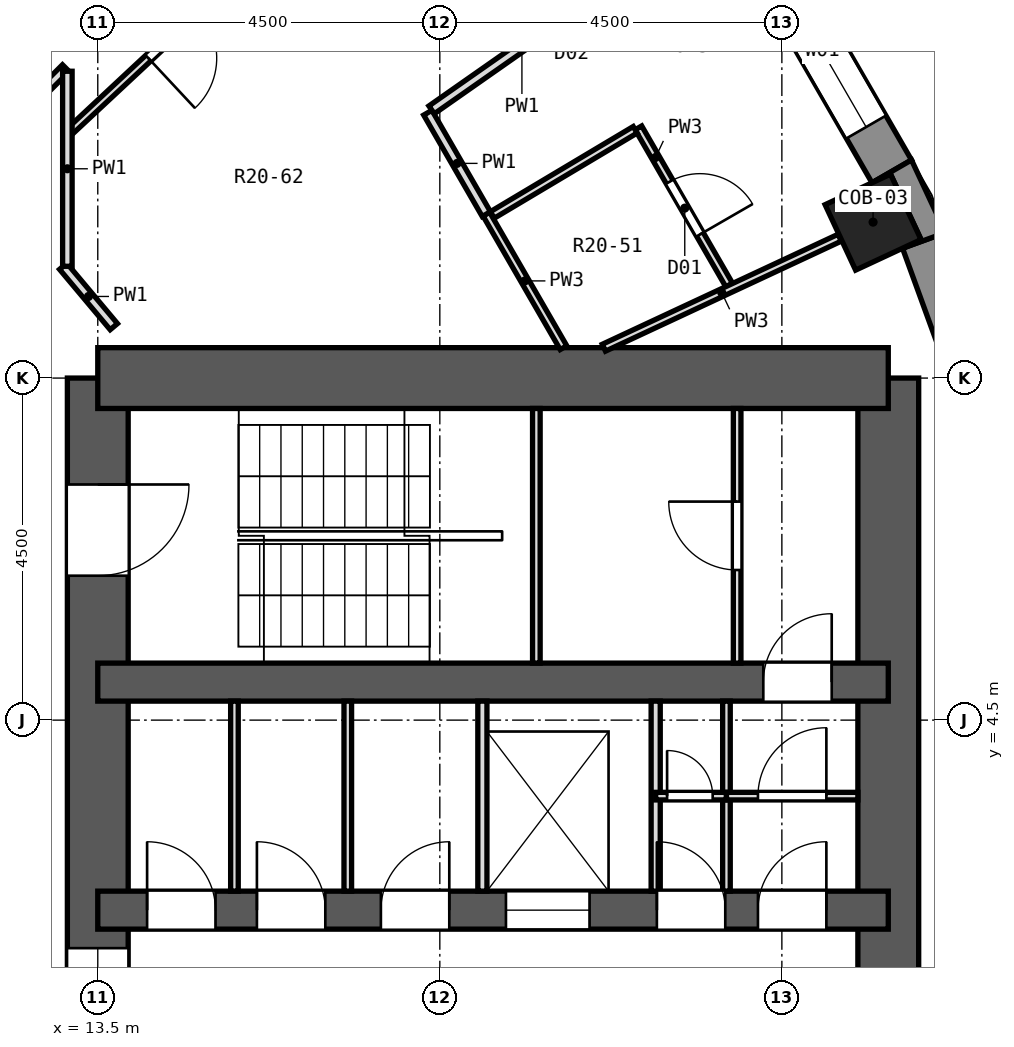
"""IFC4 building model, lengths in metres.
Left out: names, types, materials, properties, quantities, classifications, styles, units other than length and angle.
Written with IfcOpenShell. Run it as: python <this file> out.ifc"""

import sys

from ifc_helpers import new_model, si_unit, direction, frame, frame_2d, origin, origin_2d, place, context, subcontext, project, spatial, polyline, rectangle, outline, extrude, element, fill, save


model = new_model("IFC4")
c1 = context("Model", 3, precision=1e-05, world=origin(), true_north=direction((0.0, 1.0)))
c2 = subcontext(c1, "Body", "Model", "MODEL_VIEW")
j1 = project(units=[si_unit("LENGTHUNIT", "METRE"), si_unit("PLANEANGLEUNIT", "RADIAN")], contexts=[c1])
p1 = place(None, origin())
s1 = spatial("IfcSite", under=j1, at=p1, CompositionType="ELEMENT")
p2 = place(p1, origin())
s2 = spatial("IfcBuilding", under=s1, at=p2, CompositionType="ELEMENT")
p3 = place(p2, frame((0.0, 0.0, 121.6)))
s3 = spatial("IfcBuildingStorey", under=s2, at=p3, CompositionType="ELEMENT", Elevation=121.6)
p4 = place(p3, frame((23.7, 11.052, 0.0), z_axis=(0.0, 0.0, 1.0), x_axis=(0.906307787037, 0.422618261741, 0.0)))
e1 = element("IfcColumn", 1, at=p4, inside=s3, PredefinedType="COLUMN", context=c2, shape_type="SweptSolid", body=[
    extrude(rectangle(XDim=0.95, YDim=0.95, at=origin_2d()), origin(), (0.0, 0.0, 1.0), 3.3),
])
p5 = place(p3, frame((13.5, -9.0, 0.0), z_axis=(0.0, 0.0, 1.0), x_axis=(0.0, 1.0, 0.0)))
e2 = element("IfcWall", 2, at=p5, inside=s3, PredefinedType="SHEAR", context=c2, shape_type="SweptSolid", body=[
    extrude(rectangle(XDim=18.0, YDim=0.8, at=frame_2d((9.0, 0.0))), origin(), (0.0, 0.0, 1.0), 3.3),
])
p6 = place(p5, frame((15.4, 0.0, 0.0)))
e3 = element("IfcOpeningElement", 3, at=p6, cuts=e2, PredefinedType="OPENING", context=c2, shape_type="SweptSolid", body=[
    extrude(rectangle(XDim=1.2, YDim=2.1, at=frame_2d((0.6, 1.05))), frame((0.0, 0.412, 0.0), z_axis=(0.0, -1.0, 0.0), x_axis=(1.0, 0.0, 0.0)), (0.0, 0.0, 1.0), 0.824),
])
p7 = place(p5, frame((1.4, 0.0, 0.0)))
e4 = element("IfcOpeningElement", 4, at=p7, cuts=e2, PredefinedType="OPENING", context=c2, shape_type="SweptSolid", body=[
    extrude(rectangle(XDim=1.2, YDim=2.1, at=frame_2d((0.6, 1.05))), frame((0.0, 0.412, 0.0), z_axis=(0.0, -1.0, 0.0), x_axis=(1.0, 0.0, 0.0)), (0.0, 0.0, 1.0), 0.824),
])
p8 = place(p5, frame((7.5, 0.0, 0.0)))
e5 = element("IfcOpeningElement", 5, at=p8, cuts=e2, PredefinedType="OPENING", context=c2, shape_type="SweptSolid", body=[
    extrude(rectangle(XDim=3.0, YDim=2.4, at=frame_2d((1.5, 1.2))), frame((0.0, 0.412, 0.0), z_axis=(0.0, -1.0, 0.0), x_axis=(1.0, 0.0, 0.0)), (0.0, 0.0, 1.0), 0.824),
])
p9 = place(p3, frame((23.9, -9.0, 0.0), z_axis=(0.0, 0.0, 1.0), x_axis=(0.0, 1.0, 0.0)))
e6 = element("IfcWall", 6, at=p9, inside=s3, PredefinedType="SHEAR", context=c2, shape_type="SweptSolid", body=[
    extrude(rectangle(XDim=18.0, YDim=0.8, at=frame_2d((9.0, 0.0))), origin(), (0.0, 0.0, 1.0), 3.3),
])
p10 = place(p3, frame((13.5, 9.0, 0.0), z_axis=(0.0, 0.0, 1.0), x_axis=(1.0, 0.0, 0.0)))
e7 = element("IfcWall", 7, at=p10, inside=s3, PredefinedType="SHEAR", context=c2, shape_type="SweptSolid", body=[
    extrude(rectangle(XDim=10.4, YDim=0.8, at=frame_2d((5.2, 0.0))), origin(), (0.0, 0.0, 1.0), 3.3),
])
p11 = place(p3, frame((13.5, 5.0, 0.0), z_axis=(0.0, 0.0, 1.0), x_axis=(1.0, 0.0, 0.0)))
e8 = element("IfcWall", 8, at=p11, inside=s3, PredefinedType="SHEAR", context=c2, shape_type="SweptSolid", body=[
    extrude(rectangle(XDim=10.4, YDim=0.5, at=frame_2d((5.2, 0.0))), origin(), (0.0, 0.0, 1.0), 3.3),
])
p12 = place(p11, frame((8.756, 0.0, 0.0)))
e9 = element("IfcOpeningElement", 9, at=p12, cuts=e8, PredefinedType="OPENING", context=c2, shape_type="SweptSolid", body=[
    extrude(rectangle(XDim=0.9, YDim=2.1, at=frame_2d((0.45, 1.05))), frame((0.0, 0.262, 0.0), z_axis=(0.0, -1.0, 0.0), x_axis=(1.0, 0.0, 0.0)), (0.0, 0.0, 1.0), 0.524),
])
p13 = place(p3, frame((13.5, 2.0, 0.0), z_axis=(0.0, 0.0, 1.0), x_axis=(1.0, 0.0, 0.0)))
e10 = element("IfcWall", 10, at=p13, inside=s3, PredefinedType="SHEAR", context=c2, shape_type="SweptSolid", body=[
    extrude(rectangle(XDim=10.4, YDim=0.5, at=frame_2d((5.2, 0.0))), origin(), (0.0, 0.0, 1.0), 3.3),
])
p14 = place(p13, frame((5.37, 0.0, 0.0)))
e11 = element("IfcOpeningElement", 11, at=p14, cuts=e10, PredefinedType="OPENING", context=c2, shape_type="SweptSolid", body=[
    extrude(rectangle(XDim=1.1, YDim=2.1, at=frame_2d((0.55, 1.05))), frame((0.0, 0.262, 0.0), z_axis=(0.0, -1.0, 0.0), x_axis=(1.0, 0.0, 0.0)), (0.0, 0.0, 1.0), 0.524),
])
p15 = place(p13, frame((0.649, 0.0, 0.0)))
e12 = element("IfcOpeningElement", 12, at=p15, cuts=e10, PredefinedType="OPENING", context=c2, shape_type="SweptSolid", body=[
    extrude(rectangle(XDim=0.9, YDim=2.1, at=frame_2d((0.45, 1.05))), frame((0.0, 0.262, 0.0), z_axis=(0.0, -1.0, 0.0), x_axis=(1.0, 0.0, 0.0)), (0.0, 0.0, 1.0), 0.524),
])
p16 = place(p13, frame((2.094, 0.0, 0.0)))
e13 = element("IfcOpeningElement", 13, at=p16, cuts=e10, PredefinedType="OPENING", context=c2, shape_type="SweptSolid", body=[
    extrude(rectangle(XDim=0.9, YDim=2.1, at=frame_2d((0.45, 1.05))), frame((0.0, 0.262, 0.0), z_axis=(0.0, -1.0, 0.0), x_axis=(1.0, 0.0, 0.0)), (0.0, 0.0, 1.0), 0.524),
])
p17 = place(p13, frame((3.725, 0.0, 0.0)))
e14 = element("IfcOpeningElement", 14, at=p17, cuts=e10, PredefinedType="OPENING", context=c2, shape_type="SweptSolid", body=[
    extrude(rectangle(XDim=0.9, YDim=2.1, at=frame_2d((0.45, 1.05))), frame((0.0, 0.262, 0.0), z_axis=(0.0, -1.0, 0.0), x_axis=(1.0, 0.0, 0.0)), (0.0, 0.0, 1.0), 0.524),
])
p18 = place(p13, frame((7.355, 0.0, 0.0)))
e15 = element("IfcOpeningElement", 15, at=p18, cuts=e10, PredefinedType="OPENING", context=c2, shape_type="SweptSolid", body=[
    extrude(rectangle(XDim=0.9, YDim=2.1, at=frame_2d((0.45, 1.05))), frame((0.0, 0.262, 0.0), z_axis=(0.0, -1.0, 0.0), x_axis=(1.0, 0.0, 0.0)), (0.0, 0.0, 1.0), 0.524),
])
p19 = place(p13, frame((8.686, 0.0, 0.0)))
e16 = element("IfcOpeningElement", 16, at=p19, cuts=e10, PredefinedType="OPENING", context=c2, shape_type="SweptSolid", body=[
    extrude(rectangle(XDim=0.9, YDim=2.1, at=frame_2d((0.45, 1.05))), frame((0.0, 0.262, 0.0), z_axis=(0.0, -1.0, 0.0), x_axis=(1.0, 0.0, 0.0)), (0.0, 0.0, 1.0), 0.524),
])
p20 = place(p3, frame((25.617, 7.383, 0.0), z_axis=(0.0, 0.0, 1.0), x_axis=(-0.341990236633, 0.939703505393, 0.0)))
e17 = element("IfcWall", 17, at=p20, inside=s3, PredefinedType="SOLIDWALL", context=c2, shape_type="SweptSolid", body=[
    extrude(rectangle(XDim=3.648, YDim=0.6, at=frame_2d((1.824, 0.0))), origin(), (0.0, 0.0, 1.0), 2.8),
])
p21 = place(p3, frame((23.946, 11.719, 0.0), z_axis=(0.0, 0.0, 1.0), x_axis=(-0.499954196102, 0.866051847062, 0.0)))
e18 = element("IfcWall", 18, at=p21, inside=s3, PredefinedType="SOLIDWALL", context=c2, shape_type="SweptSolid", body=[
    extrude(rectangle(XDim=3.648, YDim=0.6, at=frame_2d((1.824, 0.0))), origin(), (0.0, 0.0, 1.0), 2.8),
])
p22 = place(p21, frame((0.674, 0.0, 0.9)))
e19 = element("IfcOpeningElement", 19, at=p22, cuts=e18, PredefinedType="OPENING", context=c2, shape_type="SweptSolid", body=[
    extrude(rectangle(XDim=2.3, YDim=1.8, at=frame_2d((1.15, 0.9))), frame((0.0, 0.312, 0.0), z_axis=(0.0, -1.0, 0.0), x_axis=(1.0, 0.0, 0.0)), (0.0, 0.0, 1.0), 0.624),
])
p23 = place(p3, origin())
e20 = element("IfcWall", 20, at=p23, inside=s3, PredefinedType="SOLIDWALL", context=c2, shape_type="SweptSolid", body=[
    extrude(outline(polyline([(24.651, 10.913), (24.206, 11.869), (23.686, 11.569), (23.93, 11.683), (24.331, 10.822), (24.087, 10.708), (24.651, 10.913)])), origin(), (0.0, 0.0, 1.0), 2.8),
])
p24 = place(p3, frame((18.612, 11.157, 0.0), z_axis=(0.0, 0.0, 1.0), x_axis=(0.500111227227, -0.865961177191, 0.0)))
e21 = element("IfcWall", 21, at=p24, inside=s3, PredefinedType="PARTITIONING", context=c2, shape_type="SweptSolid", body=[
    extrude(rectangle(XDim=2.029, YDim=0.1, at=frame_2d((1.015, 0.0))), origin(), (0.0, 0.0, 1.0), 2.8),
])
p25 = place(p3, frame((17.842, 12.491, 0.0), z_axis=(0.0, 0.0, 1.0), x_axis=(0.499923693419, -0.866069454927, 0.0)))
e22 = element("IfcWall", 22, at=p25, inside=s3, PredefinedType="PARTITIONING", context=c2, shape_type="SweptSolid", body=[
    extrude(rectangle(XDim=1.54, YDim=0.125, at=frame_2d((0.77, 0.0))), origin(), (0.0, 0.0, 1.0), 2.8),
])
p26 = place(p3, frame((20.613, 12.292, 0.0), z_axis=(0.0, 0.0, 1.0), x_axis=(0.499855185972, -0.866108996061, 0.0)))
e23 = element("IfcWall", 23, at=p26, inside=s3, PredefinedType="PARTITIONING", context=c2, shape_type="SweptSolid", body=[
    extrude(rectangle(XDim=2.388, YDim=0.1, at=frame_2d((1.194, 0.0))), origin(), (0.0, 0.0, 1.0), 2.8),
])
p27 = place(p26, frame((0.819, 0.0, 0.0)))
e24 = element("IfcOpeningElement", 24, at=p27, cuts=e23, PredefinedType="OPENING", context=c2, shape_type="SweptSolid", body=[
    extrude(rectangle(XDim=0.8, YDim=2.1, at=frame_2d((0.4, 1.05))), frame((0.0, 0.062, 0.0), z_axis=(0.0, -1.0, 0.0), x_axis=(1.0, 0.0, 0.0)), (0.0, 0.0, 1.0), 0.124),
])
p28 = place(p3, frame((13.045, 10.47, 0.0), z_axis=(0.0, 0.0, 1.0), x_axis=(0.642683640722, -0.766131671417, 0.0)))
e25 = element("IfcWall", 25, at=p28, inside=s3, PredefinedType="PARTITIONING", context=c2, shape_type="SweptSolid", body=[
    extrude(rectangle(XDim=1.036, YDim=0.125, at=frame_2d((0.518, 0.0))), origin(), (0.0, 0.0, 1.0), 2.8),
])
p29 = place(p3, frame((20.158, 9.399, 0.0), z_axis=(0.0, 0.0, 1.0), x_axis=(0.906223222272, 0.422799564114, 0.0)))
e26 = element("IfcWall", 26, at=p29, inside=s3, PredefinedType="PARTITIONING", context=c2, shape_type="SweptSolid", body=[
    extrude(rectangle(XDim=3.423, YDim=0.1, at=frame_2d((1.711, 0.0))), origin(), (0.0, 0.0, 1.0), 2.8),
])
p30 = place(p3, frame((18.691, 11.146, 0.0), z_axis=(0.0, 0.0, 1.0), x_axis=(0.858956412084, 0.512048710711, 0.0)))
e27 = element("IfcWall", 27, at=p30, inside=s3, PredefinedType="PARTITIONING", context=c2, shape_type="SweptSolid", body=[
    extrude(rectangle(XDim=2.188, YDim=0.1, at=frame_2d((1.094, 0.0))), origin(), (0.0, 0.0, 1.0), 2.8),
])
p31 = place(p3, frame((17.892, 12.529, 0.0), z_axis=(0.0, 0.0, 1.0), x_axis=(0.819258924995, 0.573423764607, 0.0)))
e28 = element("IfcWall", 28, at=p31, inside=s3, PredefinedType="PARTITIONING", context=c2, shape_type="SweptSolid", body=[
    extrude(rectangle(XDim=3.823, YDim=0.125, at=frame_2d((1.911, 0.0))), origin(), (0.0, 0.0, 1.0), 2.8),
])
p32 = place(p31, frame((1.796, 0.0, 0.0)))
e29 = element("IfcOpeningElement", 29, at=p32, cuts=e28, PredefinedType="OPENING", context=c2, shape_type="SweptSolid", body=[
    extrude(rectangle(XDim=0.9, YDim=2.1, at=frame_2d((0.45, 1.05))), frame((0.0, 0.074, 0.0), z_axis=(0.0, -1.0, 0.0), x_axis=(1.0, 0.0, 0.0)), (0.0, 0.0, 1.0), 0.149),
])
p33 = place(p3, frame((13.146, 12.259, 0.0), z_axis=(0.0, 0.0, 1.0), x_axis=(0.731186864942, 0.682177226633, 0.0)))
e30 = element("IfcWall", 30, at=p33, inside=s3, PredefinedType="PARTITIONING", context=c2, shape_type="SweptSolid", body=[
    extrude(rectangle(XDim=3.701, YDim=0.1, at=frame_2d((1.851, 0.0))), origin(), (0.0, 0.0, 1.0), 2.8),
])
p34 = place(p33, frame((1.394, 0.0, 0.0)))
e31 = element("IfcOpeningElement", 31, at=p34, cuts=e30, PredefinedType="OPENING", context=c2, shape_type="SweptSolid", body=[
    extrude(rectangle(XDim=0.9, YDim=2.1, at=frame_2d((0.45, 1.05))), frame((0.0, 0.062, 0.0), z_axis=(0.0, -1.0, 0.0), x_axis=(1.0, 0.0, 0.0)), (0.0, 0.0, 1.0), 0.124),
])
p35 = place(p3, frame((9.697, 9.695, 0.0), z_axis=(0.0, 0.0, 1.0), x_axis=(0.707106781187, 0.707106781187, 0.0)))
e32 = element("IfcWall", 32, at=p35, inside=s3, PredefinedType="PARTITIONING", context=c2, shape_type="SweptSolid", body=[
    extrude(rectangle(XDim=4.784, YDim=0.125, at=frame_2d((2.392, 0.0))), origin(), (0.0, 0.0, 1.0), 2.8),
])
p36 = place(p3, frame((13.1, 10.47, 0.0), z_axis=(0.0, 0.0, 1.0), x_axis=(0.0, 1.0, 0.0)))
e33 = element("IfcWall", 33, at=p36, inside=s3, PredefinedType="PARTITIONING", context=c2, shape_type="SweptSolid", body=[
    extrude(rectangle(XDim=2.566, YDim=0.125, at=frame_2d((1.283, 0.0))), origin(), (0.0, 0.0, 1.0), 2.8),
])
for number, where, z_axis, x_axis in (
    (34, (15.298, 2.25, 0.0), (0.0, 0.0, 1.0), (0.0, 1.0, 0.0)),
    (35, (16.789, 2.25, 0.0), (0.0, 0.0, 1.0), (0.0, 1.0, 0.0)),
):
    element("IfcWall", number, at=place(p3, frame(where, z_axis=z_axis, x_axis=x_axis)), inside=s3, PredefinedType="PARTITIONING", context=c2, shape_type="SweptSolid", body=[
        extrude(rectangle(XDim=2.5, YDim=0.1, at=frame_2d((1.25, 0.0))), origin(), (0.0, 0.0, 1.0), 2.8),
    ])
for number, where, z_axis, x_axis in (
    (36, (18.56, 2.25, 0.0), (0.0, 0.0, 1.0), (0.0, 1.0, 0.0)),
    (37, (20.84, 2.25, 0.0), (0.0, 0.0, 1.0), (0.0, 1.0, 0.0)),
):
    element("IfcWall", number, at=place(p3, frame(where, z_axis=z_axis, x_axis=x_axis)), inside=s3, PredefinedType="PARTITIONING", context=c2, shape_type="SweptSolid", body=[
        extrude(rectangle(XDim=2.5, YDim=0.12, at=frame_2d((1.25, 0.0))), origin(), (0.0, 0.0, 1.0), 2.8),
    ])
p37 = place(p3, frame((21.771, 2.25, 0.0), z_axis=(0.0, 0.0, 1.0), x_axis=(0.0, 1.0, 0.0)))
e38 = element("IfcWall", 38, at=p37, inside=s3, PredefinedType="PARTITIONING", context=c2, shape_type="SweptSolid", body=[
    extrude(rectangle(XDim=2.5, YDim=0.1, at=frame_2d((1.25, 0.0))), origin(), (0.0, 0.0, 1.0), 2.8),
])
p38 = place(p3, frame((20.84, 3.5, 0.0), z_axis=(0.0, 0.0, 1.0), x_axis=(1.0, 0.0, 0.0)))
e39 = element("IfcWall", 39, at=p38, inside=s3, PredefinedType="PARTITIONING", context=c2, shape_type="SweptSolid", body=[
    extrude(rectangle(XDim=0.931, YDim=0.1, at=frame_2d((0.465, 0.0))), origin(), (0.0, 0.0, 1.0), 2.8),
])
p39 = place(p38, frame((0.15, 0.0, 0.0)))
e40 = element("IfcOpeningElement", 40, at=p39, cuts=e39, PredefinedType="OPENING", context=c2, shape_type="SweptSolid", body=[
    extrude(rectangle(XDim=0.6, YDim=2.1, at=frame_2d((0.3, 1.05))), frame((0.0, 0.062, 0.0), z_axis=(0.0, -1.0, 0.0), x_axis=(1.0, 0.0, 0.0)), (0.0, 0.0, 1.0), 0.124),
])
p40 = place(p3, frame((21.771, 3.5, 0.0), z_axis=(0.0, 0.0, 1.0), x_axis=(1.0, 0.0, 0.0)))
e41 = element("IfcWall", 41, at=p40, inside=s3, PredefinedType="PARTITIONING", context=c2, shape_type="SweptSolid", body=[
    extrude(rectangle(XDim=1.729, YDim=0.1, at=frame_2d((0.865, 0.0))), origin(), (0.0, 0.0, 1.0), 2.8),
])
p41 = place(p40, frame((0.415, 0.0, 0.0)))
e42 = element("IfcOpeningElement", 42, at=p41, cuts=e41, PredefinedType="OPENING", context=c2, shape_type="SweptSolid", body=[
    extrude(rectangle(XDim=0.9, YDim=2.1, at=frame_2d((0.45, 1.05))), frame((0.0, 0.062, 0.0), z_axis=(0.0, -1.0, 0.0), x_axis=(1.0, 0.0, 0.0)), (0.0, 0.0, 1.0), 0.124),
])
p42 = place(p3, frame((19.27, 5.25, 0.0), z_axis=(0.0, 0.0, 1.0), x_axis=(0.0, 1.0, 0.0)))
e43 = element("IfcWall", 43, at=p42, inside=s3, PredefinedType="PARTITIONING", context=c2, shape_type="SweptSolid", body=[
    extrude(rectangle(XDim=3.35, YDim=0.1, at=frame_2d((1.675, 0.0))), origin(), (0.0, 0.0, 1.0), 2.8),
])
p43 = place(p3, frame((21.912, 5.25, 0.0), z_axis=(0.0, 0.0, 1.0), x_axis=(0.0, 1.0, 0.0)))
e44 = element("IfcWall", 44, at=p43, inside=s3, PredefinedType="PARTITIONING", context=c2, shape_type="SweptSolid", body=[
    extrude(rectangle(XDim=3.35, YDim=0.1, at=frame_2d((1.675, 0.0))), origin(), (0.0, 0.0, 1.0), 2.8),
])
p44 = place(p43, frame((1.225, 0.0, 0.0)))
e45 = element("IfcOpeningElement", 45, at=p44, cuts=e44, PredefinedType="OPENING", context=c2, shape_type="SweptSolid", body=[
    extrude(rectangle(XDim=0.9, YDim=2.1, at=frame_2d((0.45, 1.05))), frame((0.0, 0.062, 0.0), z_axis=(0.0, -1.0, 0.0), x_axis=(1.0, 0.0, 0.0)), (0.0, 0.0, 1.0), 0.124),
])
p45 = place(p22, origin())
e46 = element("IfcWindow", 46, at=p45, inside=s3, PartitioningType="SINGLE_PANEL", PredefinedType="WINDOW", context=c2, shape_type="SweptSolid", body=[
    extrude(rectangle(XDim=2.3, YDim=1.8, at=frame_2d((1.15, 0.9))), frame((0.0, 0.18, 0.0), z_axis=(0.0, -1.0, 0.0), x_axis=(1.0, 0.0, 0.0)), (0.0, 0.0, 1.0), 0.06),
])
fill(e19, e46)
p46 = place(p27, origin())
e47 = element("IfcDoor", 47, at=p46, inside=s3, OperationType="SINGLE_SWING_RIGHT", PredefinedType="DOOR", context=c2, shape_type="SweptSolid", body=[
    extrude(rectangle(XDim=0.8, YDim=2.1, at=frame_2d((0.4, 1.05))), frame((0.0, 0.025, 0.0), z_axis=(0.0, -1.0, 0.0), x_axis=(1.0, 0.0, 0.0)), (0.0, 0.0, 1.0), 0.05),
])
fill(e24, e47)
p47 = place(p34, frame((0.9, 0.0, 0.0), z_axis=(0.0, 0.0, 1.0), x_axis=(-1.0, 0.0, 0.0)))
e48 = element("IfcDoor", 48, at=p47, inside=s3, OperationType="SINGLE_SWING_RIGHT", PredefinedType="DOOR", context=c2, shape_type="SweptSolid", body=[
    extrude(rectangle(XDim=0.9, YDim=2.1, at=frame_2d((0.45, 1.05))), frame((0.0, 0.025, 0.0), z_axis=(0.0, -1.0, 0.0), x_axis=(1.0, 0.0, 0.0)), (0.0, 0.0, 1.0), 0.05),
])
fill(e31, e48)
p48 = place(p14, origin())
e49 = element("IfcDoor", 49, at=p48, inside=s3, OperationType="DOUBLE_DOOR_SLIDING", PredefinedType="DOOR", context=c2, shape_type="SweptSolid", body=[
    extrude(rectangle(XDim=1.1, YDim=2.1, at=frame_2d((0.55, 1.05))), frame((0.0, 0.025, 0.0), z_axis=(0.0, -1.0, 0.0), x_axis=(1.0, 0.0, 0.0)), (0.0, 0.0, 1.0), 0.05),
])
fill(e11, e49)
p49 = place(p15, origin())
e50 = element("IfcDoor", 50, at=p49, inside=s3, OperationType="SINGLE_SWING_LEFT", PredefinedType="DOOR", context=c2, shape_type="SweptSolid", body=[
    extrude(rectangle(XDim=0.9, YDim=2.1, at=frame_2d((0.45, 1.05))), frame((0.0, 0.025, 0.0), z_axis=(0.0, -1.0, 0.0), x_axis=(1.0, 0.0, 0.0)), (0.0, 0.0, 1.0), 0.05),
])
fill(e12, e50)
p50 = place(p16, origin())
e51 = element("IfcDoor", 51, at=p50, inside=s3, OperationType="SINGLE_SWING_LEFT", PredefinedType="DOOR", context=c2, shape_type="SweptSolid", body=[
    extrude(rectangle(XDim=0.9, YDim=2.1, at=frame_2d((0.45, 1.05))), frame((0.0, 0.025, 0.0), z_axis=(0.0, -1.0, 0.0), x_axis=(1.0, 0.0, 0.0)), (0.0, 0.0, 1.0), 0.05),
])
fill(e13, e51)
p51 = place(p17, origin())
e52 = element("IfcDoor", 52, at=p51, inside=s3, OperationType="SINGLE_SWING_RIGHT", PredefinedType="DOOR", context=c2, shape_type="SweptSolid", body=[
    extrude(rectangle(XDim=0.9, YDim=2.1, at=frame_2d((0.45, 1.05))), frame((0.0, 0.025, 0.0), z_axis=(0.0, -1.0, 0.0), x_axis=(1.0, 0.0, 0.0)), (0.0, 0.0, 1.0), 0.05),
])
fill(e14, e52)
p52 = place(p18, origin())
e53 = element("IfcDoor", 53, at=p52, inside=s3, OperationType="SINGLE_SWING_LEFT", PredefinedType="DOOR", context=c2, shape_type="SweptSolid", body=[
    extrude(rectangle(XDim=0.9, YDim=2.1, at=frame_2d((0.45, 1.05))), frame((0.0, 0.025, 0.0), z_axis=(0.0, -1.0, 0.0), x_axis=(1.0, 0.0, 0.0)), (0.0, 0.0, 1.0), 0.05),
])
fill(e15, e53)
p53 = place(p19, origin())
e54 = element("IfcDoor", 54, at=p53, inside=s3, OperationType="SINGLE_SWING_RIGHT", PredefinedType="DOOR", context=c2, shape_type="SweptSolid", body=[
    extrude(rectangle(XDim=0.9, YDim=2.1, at=frame_2d((0.45, 1.05))), frame((0.0, 0.025, 0.0), z_axis=(0.0, -1.0, 0.0), x_axis=(1.0, 0.0, 0.0)), (0.0, 0.0, 1.0), 0.05),
])
fill(e16, e54)
p54 = place(p39, origin())
e55 = element("IfcDoor", 55, at=p54, inside=s3, OperationType="SINGLE_SWING_LEFT", PredefinedType="DOOR", context=c2, shape_type="SweptSolid", body=[
    extrude(rectangle(XDim=0.6, YDim=2.1, at=frame_2d((0.3, 1.05))), frame((0.0, 0.025, 0.0), z_axis=(0.0, -1.0, 0.0), x_axis=(1.0, 0.0, 0.0)), (0.0, 0.0, 1.0), 0.05),
])
fill(e40, e55)
p55 = place(p41, origin())
e56 = element("IfcDoor", 56, at=p55, inside=s3, OperationType="SINGLE_SWING_RIGHT", PredefinedType="DOOR", context=c2, shape_type="SweptSolid", body=[
    extrude(rectangle(XDim=0.9, YDim=2.1, at=frame_2d((0.45, 1.05))), frame((0.0, 0.025, 0.0), z_axis=(0.0, -1.0, 0.0), x_axis=(1.0, 0.0, 0.0)), (0.0, 0.0, 1.0), 0.05),
])
fill(e42, e56)
p56 = place(p44, origin())
e57 = element("IfcDoor", 57, at=p56, inside=s3, OperationType="SINGLE_SWING_RIGHT", PredefinedType="DOOR", context=c2, shape_type="SweptSolid", body=[
    extrude(rectangle(XDim=0.9, YDim=2.1, at=frame_2d((0.45, 1.05))), frame((0.0, 0.025, 0.0), z_axis=(0.0, -1.0, 0.0), x_axis=(1.0, 0.0, 0.0)), (0.0, 0.0, 1.0), 0.05),
])
fill(e45, e57)
p57 = place(p12, origin())
e58 = element("IfcDoor", 58, at=p57, inside=s3, OperationType="SINGLE_SWING_RIGHT", PredefinedType="DOOR", context=c2, shape_type="SweptSolid", body=[
    extrude(rectangle(XDim=0.9, YDim=2.1, at=frame_2d((0.45, 1.05))), frame((0.0, 0.025, 0.0), z_axis=(0.0, -1.0, 0.0), x_axis=(1.0, 0.0, 0.0)), (0.0, 0.0, 1.0), 0.05),
])
fill(e9, e58)
p58 = place(p6, frame((1.2, 0.0, 0.0), z_axis=(0.0, 0.0, 1.0), x_axis=(-1.0, 0.0, 0.0)))
e59 = element("IfcDoor", 59, at=p58, inside=s3, OperationType="SINGLE_SWING_LEFT", PredefinedType="DOOR", context=c2, shape_type="SweptSolid", body=[
    extrude(rectangle(XDim=1.2, YDim=2.1, at=frame_2d((0.6, 1.05))), frame((0.0, 0.025, 0.0), z_axis=(0.0, -1.0, 0.0), x_axis=(1.0, 0.0, 0.0)), (0.0, 0.0, 1.0), 0.05),
])
fill(e3, e59)
p59 = place(p8, origin())
e60 = element("IfcDoor", 60, at=p59, inside=s3, OperationType="DOUBLE_DOOR_SLIDING", PredefinedType="DOOR", context=c2, shape_type="SweptSolid", body=[
    extrude(rectangle(XDim=3.0, YDim=2.4, at=frame_2d((1.5, 1.2))), frame((0.0, 0.025, 0.0), z_axis=(0.0, -1.0, 0.0), x_axis=(1.0, 0.0, 0.0)), (0.0, 0.0, 1.0), 0.05),
])
fill(e5, e60)
save(model, sys.argv[1])
